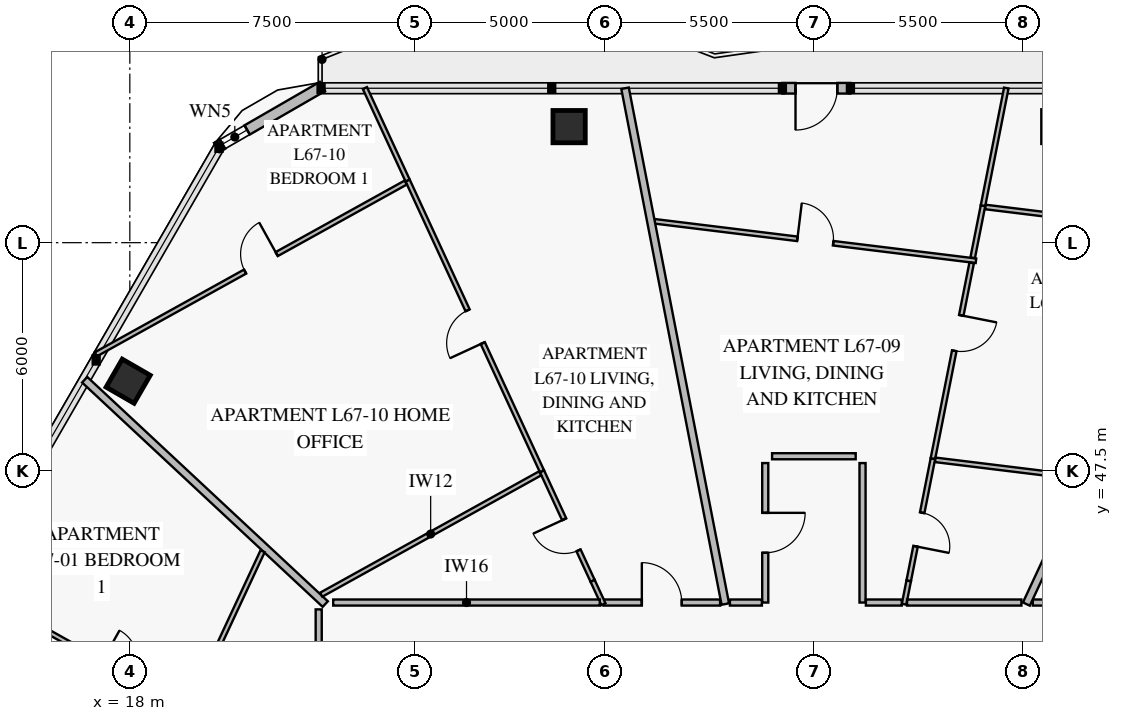
"""IFC4 building model, lengths in metres.
Left out: names, types, materials, properties, quantities, classifications, styles, units other than length and angle.
Written with IfcOpenShell. Run it as: python <this file> out.ifc"""

import sys

from ifc_helpers import new_model, si_unit, direction, frame, frame_2d, origin, origin_2d, place, context, subcontext, project, spatial, rectangle, extrude, element, fill, save


model = new_model("IFC4")
c1 = context("Model", 3, precision=1e-05, world=origin(), true_north=direction((0.0, 1.0)))
c2 = subcontext(c1, "Body", "Model", "MODEL_VIEW")
j1 = project(units=[si_unit("LENGTHUNIT", "METRE"), si_unit("PLANEANGLEUNIT", "RADIAN")], contexts=[c1])
p1 = place(None, origin())
s1 = spatial("IfcSite", under=j1, at=p1, CompositionType="ELEMENT")
p2 = place(p1, origin())
s2 = spatial("IfcBuilding", under=s1, at=p2, CompositionType="ELEMENT")
p3 = place(p2, frame((0.0, 0.0, 265.4)))
s3 = spatial("IfcBuildingStorey", under=s2, at=p3, CompositionType="ELEMENT", Elevation=265.4)
for number, where, z_axis, x_axis in (
    (1, (42.441, 56.554, 0.0), (0.0, 0.0, 1.0), (-1.0, 0.0, 0.0)),
    (2, (29.559, 56.554, 0.0), (0.0, 0.0, 1.0), (-1.0, 0.0, 0.0)),
    (3, (17.956, 49.855, 0.0), (0.0, 0.0, 1.0), (-0.5, -0.866, 0.0)),
):
    element("IfcColumn", number, at=place(p3, frame(where, z_axis=z_axis, x_axis=x_axis)), inside=s3, PredefinedType="COLUMN", context=c2, shape_type="SweptSolid", body=[
        extrude(rectangle(XDim=0.85, YDim=0.85, at=origin_2d()), origin(), (0.0, 0.0, 1.0), 3.55),
    ])
p4 = place(p3, frame((20.285, 56.004, 0.0), z_axis=(0.0, 0.0, 1.0), x_axis=(0.866028773314, 0.499994163758, 0.0)))
e4 = element("IfcWall", 4, at=p4, inside=s3, PredefinedType="SOLIDWALL", context=c2, shape_type="SweptSolid", body=[
    extrude(rectangle(XDim=3.215, YDim=0.28, at=frame_2d((1.607, 0.0))), origin(), (0.0, 0.0, 1.0), 3.55),
])
p5 = place(p4, frame((0.176, 0.0, 0.85)))
e5 = element("IfcOpeningElement", 5, at=p5, cuts=e4, PredefinedType="OPENING", context=c2, shape_type="SweptSolid", body=[
    extrude(rectangle(XDim=0.75, YDim=1.5, at=frame_2d((0.375, 0.75))), frame((0.0, 0.152, 0.0), z_axis=(0.0, -1.0, 0.0), x_axis=(1.0, 0.0, 0.0)), (0.0, 0.0, 1.0), 0.304),
])
p6 = place(p3, frame((35.171, 57.564, 0.0), z_axis=(0.0, 0.0, 1.0), x_axis=(1.0, 0.0, 0.0)))
e6 = element("IfcWall", 6, at=p6, inside=s3, PredefinedType="SOLIDWALL", context=c2, shape_type="SweptSolid", body=[
    extrude(rectangle(XDim=1.79, YDim=0.28, at=frame_2d((0.895, 0.0))), origin(), (0.0, 0.0, 1.0), 3.55),
])
p7 = place(p6, frame((0.345, 0.0, 0.0)))
e7 = element("IfcOpeningElement", 7, at=p7, cuts=e6, PredefinedType="OPENING", context=c2, shape_type="SweptSolid", body=[
    extrude(rectangle(XDim=1.1, YDim=2.2, at=frame_2d((0.55, 1.1))), frame((0.0, 0.152, 0.0), z_axis=(0.0, -1.0, 0.0), x_axis=(1.0, 0.0, 0.0)), (0.0, 0.0, 1.0), 0.304),
])
p8 = place(p3, frame((16.741, 42.763, 0.0), z_axis=(0.0, 0.0, 1.0), x_axis=(-0.872910360515, 0.487880623212, 0.0)))
e8 = element("IfcWall", 8, at=p8, inside=s3, PredefinedType="PARTITIONING", context=c2, shape_type="SweptSolid", body=[
    extrude(rectangle(XDim=3.508, YDim=0.12, at=frame_2d((1.754, 0.0))), origin(), (0.0, 0.0, 1.0), 2.93),
])
p9 = place(p3, frame((48.85, 44.03, 0.0), z_axis=(0.0, 0.0, 1.0), x_axis=(-1.0, 0.0, 0.0)))
e9 = element("IfcWall", 9, at=p9, inside=s3, PredefinedType="PARTITIONING", context=c2, shape_type="SweptSolid", body=[
    extrude(rectangle(XDim=7.09, YDim=0.16, at=frame_2d((3.545, 0.0))), origin(), (0.0, 0.0, 1.0), 2.95),
])
p10 = place(p9, frame((3.02, 0.0, 0.0)))
e10 = element("IfcOpeningElement", 10, at=p10, cuts=e9, PredefinedType="OPENING", context=c2, shape_type="SweptSolid", body=[
    extrude(rectangle(XDim=1.05, YDim=2.15, at=frame_2d((0.525, 1.075))), frame((0.0, 0.092, 0.0), z_axis=(0.0, -1.0, 0.0), x_axis=(1.0, 0.0, 0.0)), (0.0, 0.0, 1.0), 0.184),
])
p11 = place(p3, frame((40.265, 53.024, 0.0), z_axis=(0.0, 0.0, 1.0), x_axis=(-0.992544489296, 0.121882881359, 0.0)))
e11 = element("IfcWall", 11, at=p11, inside=s3, PredefinedType="PARTITIONING", context=c2, shape_type="SweptSolid", body=[
    extrude(rectangle(XDim=8.519, YDim=0.12, at=frame_2d((4.26, 0.0))), origin(), (0.0, 0.0, 1.0), 3.55),
])
p12 = place(p11, frame((3.784, 0.0, 0.0)))
e12 = element("IfcOpeningElement", 12, at=p12, cuts=e11, PredefinedType="OPENING", context=c2, shape_type="SweptSolid", body=[
    extrude(rectangle(XDim=0.95, YDim=2.1, at=frame_2d((0.475, 1.05))), frame((0.0, 0.072, 0.0), z_axis=(0.0, -1.0, 0.0), x_axis=(1.0, 0.0, 0.0)), (0.0, 0.0, 1.0), 0.144),
])
p13 = place(p3, frame((38.495, 44.6, 0.0), z_axis=(0.0, 0.0, 1.0), x_axis=(0.194240919575, 0.980953854757, 0.0)))
e13 = element("IfcWall", 13, at=p13, inside=s3, PredefinedType="PARTITIONING", context=c2, shape_type="SweptSolid", body=[
    extrude(rectangle(XDim=3.281, YDim=0.12, at=frame_2d((1.64, 0.0))), origin(), (0.0, 0.0, 1.0), 3.55),
])
p14 = place(p13, frame((0.928, 0.0, 0.0)))
e14 = element("IfcOpeningElement", 14, at=p14, cuts=e13, PredefinedType="OPENING", context=c2, shape_type="SweptSolid", body=[
    extrude(rectangle(XDim=0.9, YDim=2.1, at=frame_2d((0.45, 1.05))), frame((0.0, 0.072, 0.0), z_axis=(0.0, -1.0, 0.0), x_axis=(1.0, 0.0, 0.0)), (0.0, 0.0, 1.0), 0.144),
])
p15 = place(p3, frame((39.132, 47.818, 0.0), z_axis=(0.0, 0.0, 1.0), x_axis=(0.194247124133, 0.980952626158, 0.0)))
e15 = element("IfcWall", 15, at=p15, inside=s3, PredefinedType="PARTITIONING", context=c2, shape_type="SweptSolid", body=[
    extrude(rectangle(XDim=5.251, YDim=0.12, at=frame_2d((2.625, 0.0))), origin(), (0.0, 0.0, 1.0), 3.15),
])
p16 = place(p15, frame((2.892, 0.0, 0.0)))
e16 = element("IfcOpeningElement", 16, at=p16, cuts=e15, PredefinedType="OPENING", context=c2, shape_type="SweptSolid", body=[
    extrude(rectangle(XDim=0.95, YDim=2.1, at=frame_2d((0.475, 1.05))), frame((0.0, 0.072, 0.0), z_axis=(0.0, -1.0, 0.0), x_axis=(1.0, 0.0, 0.0)), (0.0, 0.0, 1.0), 0.144),
])
p17 = place(p3, frame((40.178, 53.103, 0.0), z_axis=(0.0, 0.0, 1.0), x_axis=(0.194299662618, 0.980942221085, 0.0)))
e17 = element("IfcWall", 17, at=p17, inside=s3, PredefinedType="PARTITIONING", context=c2, shape_type="SweptSolid", body=[
    extrude(rectangle(XDim=1.396, YDim=0.12, at=frame_2d((0.698, 0.0))), origin(), (0.0, 0.0, 1.0), 3.55),
])
p18 = place(p3, frame((46.028, 53.762, 0.0), z_axis=(0.0, 0.0, 1.0), x_axis=(-0.992544574318, 0.121882188984, 0.0)))
e18 = element("IfcWall", 18, at=p18, inside=s3, PredefinedType="PARTITIONING", context=c2, shape_type="SweptSolid", body=[
    extrude(rectangle(XDim=5.557, YDim=0.12, at=frame_2d((2.778, 0.0))), origin(), (0.0, 0.0, 1.0), 2.95),
])
p19 = place(p18, frame((2.387, 0.0, 0.0)))
e19 = element("IfcOpeningElement", 19, at=p19, cuts=e18, PredefinedType="OPENING", context=c2, shape_type="SweptSolid", body=[
    extrude(rectangle(XDim=0.95, YDim=2.1, at=frame_2d((0.475, 1.05))), frame((0.0, 0.072, 0.0), z_axis=(0.0, -1.0, 0.0), x_axis=(1.0, 0.0, 0.0)), (0.0, 0.0, 1.0), 0.144),
])
p20 = place(p3, frame((34.72, 47.7, 0.0), z_axis=(0.0, 0.0, 1.0), x_axis=(0.0, -1.0, 0.0)))
e20 = element("IfcWall", 20, at=p20, inside=s3, PredefinedType="PARTITIONING", context=c2, shape_type="SweptSolid", body=[
    extrude(rectangle(XDim=3.67, YDim=0.16, at=frame_2d((1.835, 0.0))), origin(), (0.0, 0.0, 1.0), 3.55),
])
p21 = place(p20, frame((1.31, 0.0, 0.0)))
e21 = element("IfcOpeningElement", 21, at=p21, cuts=e20, PredefinedType="OPENING", context=c2, shape_type="SweptSolid", body=[
    extrude(rectangle(XDim=1.05, YDim=2.15, at=frame_2d((0.525, 1.075))), frame((0.0, 0.092, 0.0), z_axis=(0.0, -1.0, 0.0), x_axis=(1.0, 0.0, 0.0)), (0.0, 0.0, 1.0), 0.184),
])
p22 = place(p3, frame((30.178, 44.6, 0.0), z_axis=(0.0, 0.0, 1.0), x_axis=(-0.419438119549, 0.907783930167, 0.0)))
e22 = element("IfcWall", 22, at=p22, inside=s3, PredefinedType="PARTITIONING", context=c2, shape_type="SweptSolid", body=[
    extrude(rectangle(XDim=3.178, YDim=0.12, at=frame_2d((1.589, 0.0))), origin(), (0.0, 0.0, 1.0), 3.55),
])
p23 = place(p22, frame((0.885, 0.0, 0.0)))
e23 = element("IfcOpeningElement", 23, at=p23, cuts=e22, PredefinedType="OPENING", context=c2, shape_type="SweptSolid", body=[
    extrude(rectangle(XDim=0.9, YDim=2.1, at=frame_2d((0.45, 1.05))), frame((0.0, 0.072, 0.0), z_axis=(0.0, -1.0, 0.0), x_axis=(1.0, 0.0, 0.0)), (0.0, 0.0, 1.0), 0.144),
])
p24 = place(p3, frame((28.845, 47.485, 0.0), z_axis=(0.0, 0.0, 1.0), x_axis=(-0.419453006553, 0.907777051535, 0.0)))
e24 = element("IfcWall", 24, at=p24, inside=s3, PredefinedType="PARTITIONING", context=c2, shape_type="SweptSolid", body=[
    extrude(rectangle(XDim=8.43, YDim=0.12, at=frame_2d((4.215, 0.0))), origin(), (0.0, 0.0, 1.0), 2.93),
])
p25 = place(p24, frame((3.715, 0.0, 0.0)))
e25 = element("IfcOpeningElement", 25, at=p25, cuts=e24, PredefinedType="OPENING", context=c2, shape_type="SweptSolid", body=[
    extrude(rectangle(XDim=0.95, YDim=2.1, at=frame_2d((0.475, 1.05))), frame((0.0, 0.072, 0.0), z_axis=(0.0, -1.0, 0.0), x_axis=(1.0, 0.0, 0.0)), (0.0, 0.0, 1.0), 0.144),
])
p26 = place(p3, frame((25.26, 55.082, 0.0), z_axis=(0.0, 0.0, 1.0), x_axis=(-0.874617638419, -0.484813352298, 0.0)))
e26 = element("IfcWall", 26, at=p26, inside=s3, PredefinedType="PARTITIONING", context=c2, shape_type="SweptSolid", body=[
    extrude(rectangle(XDim=9.323, YDim=0.12, at=frame_2d((4.661, 0.0))), origin(), (0.0, 0.0, 1.0), 3.55),
])
p27 = place(p26, frame((3.882, 0.0, 0.0)))
e27 = element("IfcOpeningElement", 27, at=p27, cuts=e26, PredefinedType="OPENING", context=c2, shape_type="SweptSolid", body=[
    extrude(rectangle(XDim=0.95, YDim=2.1, at=frame_2d((0.475, 1.05))), frame((0.0, 0.072, 0.0), z_axis=(0.0, -1.0, 0.0), x_axis=(1.0, 0.0, 0.0)), (0.0, 0.0, 1.0), 0.144),
])
p28 = place(p3, frame((33.532, 44.03, 0.0), z_axis=(0.0, 0.0, 1.0), x_axis=(-1.0, 0.0, 0.0)))
e28 = element("IfcWall", 28, at=p28, inside=s3, PredefinedType="PARTITIONING", context=c2, shape_type="SweptSolid", body=[
    extrude(rectangle(XDim=3.069, YDim=0.16, at=frame_2d((1.534, 0.0))), origin(), (0.0, 0.0, 1.0), 2.95),
])
p29 = place(p28, frame((1.009, 0.0, 0.0)))
e29 = element("IfcOpeningElement", 29, at=p29, cuts=e28, PredefinedType="OPENING", context=c2, shape_type="SweptSolid", body=[
    extrude(rectangle(XDim=1.05, YDim=2.15, at=frame_2d((0.525, 1.075))), frame((0.0, 0.092, 0.0), z_axis=(0.0, -1.0, 0.0), x_axis=(1.0, 0.0, 0.0)), (0.0, 0.0, 1.0), 0.184),
])
p30 = place(p3, frame((23.143, 43.99, 0.0), z_axis=(0.0, 0.0, 1.0), x_axis=(-0.731342217011, 0.682010675589, 0.0)))
e30 = element("IfcWall", 30, at=p30, inside=s3, PredefinedType="PARTITIONING", context=c2, shape_type="SweptSolid", body=[
    extrude(rectangle(XDim=8.656, YDim=0.2, at=frame_2d((4.328, 0.0))), origin(), (0.0, 0.0, 1.0), 2.93),
])
p31 = place(p3, frame((21.494, 45.38, 0.0), z_axis=(0.0, 0.0, 1.0), x_axis=(-0.422603236373, -0.906314793329, 0.0)))
e31 = element("IfcWall", 31, at=p31, inside=s3, PredefinedType="PARTITIONING", context=c2, shape_type="SweptSolid", body=[
    extrude(rectangle(XDim=4.547, YDim=0.12, at=frame_2d((2.273, 0.0))), origin(), (0.0, 0.0, 1.0), 3.15),
])
p32 = place(p3, frame((41.591, 43.99, 0.0), z_axis=(0.0, 0.0, 1.0), x_axis=(0.422607909104, 0.906312614479, 0.0)))
e32 = element("IfcWall", 32, at=p32, inside=s3, PredefinedType="PARTITIONING", context=c2, shape_type="SweptSolid", body=[
    extrude(rectangle(XDim=14.977, YDim=0.2, at=frame_2d((7.488, 0.0))), origin(), (0.0, 0.0, 1.0), 2.93),
])
p33 = place(p3, frame((38.373, 43.986, 0.0), z_axis=(0.0, 0.0, 1.0), x_axis=(0.194092051537, 0.98098332072, 0.0)))
e33 = element("IfcWall", 33, at=p33, inside=s3, PredefinedType="PARTITIONING", context=c2, shape_type="SweptSolid", body=[
    extrude(rectangle(XDim=0.626, YDim=0.12, at=frame_2d((0.313, 0.0))), origin(), (0.0, 0.0, 1.0), 3.55),
])
p34 = place(p3, frame((40.45, 54.472, 0.0), z_axis=(0.0, 0.0, 1.0), x_axis=(0.194226638518, 0.980956682474, 0.0)))
e34 = element("IfcWall", 34, at=p34, inside=s3, PredefinedType="PARTITIONING", context=c2, shape_type="SweptSolid", body=[
    extrude(rectangle(XDim=3.156, YDim=0.12, at=frame_2d((1.578, 0.0))), origin(), (0.0, 0.0, 1.0), 2.93),
])
p35 = place(p3, frame((43.022, 47.315, 0.0), z_axis=(0.0, 0.0, 1.0), x_axis=(-0.992546276814, 0.121868323949, 0.0)))
e35 = element("IfcWall", 35, at=p35, inside=s3, PredefinedType="PARTITIONING", context=c2, shape_type="SweptSolid", body=[
    extrude(rectangle(XDim=3.856, YDim=0.12, at=frame_2d((1.928, 0.0))), origin(), (0.0, 0.0, 1.0), 2.95),
])
p36 = place(p3, frame((33.669, 43.99, 0.0), z_axis=(0.0, 0.0, 1.0), x_axis=(-0.190806334077, 0.981627700748, 0.0)))
e36 = element("IfcWall", 36, at=p36, inside=s3, PredefinedType="PARTITIONING", context=c2, shape_type="SweptSolid", body=[
    extrude(rectangle(XDim=13.828, YDim=0.2, at=frame_2d((6.914, 0.0))), origin(), (0.0, 0.0, 1.0), 2.93),
])
p37 = place(p3, frame((30.461, 43.987, 0.0), z_axis=(0.0, 0.0, 1.0), x_axis=(-0.419516805105, 0.907747569666, 0.0)))
e37 = element("IfcWall", 37, at=p37, inside=s3, PredefinedType="PARTITIONING", context=c2, shape_type="SweptSolid", body=[
    extrude(rectangle(XDim=0.675, YDim=0.12, at=frame_2d((0.337, 0.0))), origin(), (0.0, 0.0, 1.0), 3.55),
])
p38 = place(p3, frame((25.309, 55.137, 0.0), z_axis=(0.0, 0.0, 1.0), x_axis=(-0.419509024285, 0.907751165542, 0.0)))
e38 = element("IfcWall", 38, at=p38, inside=s3, PredefinedType="PARTITIONING", context=c2, shape_type="SweptSolid", body=[
    extrude(rectangle(XDim=2.678, YDim=0.12, at=frame_2d((1.339, 0.0))), origin(), (0.0, 0.0, 1.0), 3.55),
])
p39 = place(p3, frame((28.796, 47.429, 0.0), z_axis=(0.0, 0.0, 1.0), x_axis=(-0.874623780767, -0.484802271155, 0.0)))
e39 = element("IfcWall", 39, at=p39, inside=s3, PredefinedType="PARTITIONING", context=c2, shape_type="SweptSolid", body=[
    extrude(rectangle(XDim=6.585, YDim=0.12, at=frame_2d((3.293, 0.0))), origin(), (0.0, 0.0, 1.0), 2.95),
])
p40 = place(p3, frame((22.97, 43.85, 0.0), z_axis=(0.0, 0.0, 1.0), x_axis=(0.0, -1.0, 0.0)))
e40 = element("IfcWall", 40, at=p40, inside=s3, PredefinedType="PARTITIONING", context=c2, shape_type="SweptSolid", body=[
    extrude(rectangle(XDim=4.49, YDim=0.16, at=frame_2d((2.245, 0.0))), origin(), (0.0, 0.0, 1.0), 3.55),
])
p41 = place(p3, frame((37.28, 44.03, 0.0), z_axis=(0.0, 0.0, 1.0), x_axis=(0.0, 1.0, 0.0)))
e41 = element("IfcWall", 41, at=p41, inside=s3, PredefinedType="PARTITIONING", context=c2, shape_type="SweptSolid", body=[
    extrude(rectangle(XDim=3.67, YDim=0.16, at=frame_2d((1.835, 0.0))), origin(), (0.0, 0.0, 1.0), 3.55),
])
p42 = place(p3, frame((37.1, 47.88, 0.0), z_axis=(0.0, 0.0, 1.0), x_axis=(-1.0, 0.0, 0.0)))
e42 = element("IfcWall", 42, at=p42, inside=s3, PredefinedType="PARTITIONING", context=c2, shape_type="SweptSolid", body=[
    extrude(rectangle(XDim=2.2, YDim=0.16, at=frame_2d((1.1, 0.0))), origin(), (0.0, 0.0, 1.0), 3.55),
])
p43 = place(p3, frame((38.313, 44.03, 0.0), z_axis=(0.0, 0.0, 1.0), x_axis=(-1.0, 0.0, 0.0)))
e43 = element("IfcWall", 43, at=p43, inside=s3, PredefinedType="PARTITIONING", context=c2, shape_type="SweptSolid", body=[
    extrude(rectangle(XDim=0.945, YDim=0.16, at=frame_2d((0.472, 0.0))), origin(), (0.0, 0.0, 1.0), 3.55),
])
p44 = place(p3, frame((34.632, 44.03, 0.0), z_axis=(0.0, 0.0, 1.0), x_axis=(-1.0, 0.0, 0.0)))
e44 = element("IfcWall", 44, at=p44, inside=s3, PredefinedType="PARTITIONING", context=c2, shape_type="SweptSolid", body=[
    extrude(rectangle(XDim=0.841, YDim=0.16, at=frame_2d((0.421, 0.0))), origin(), (0.0, 0.0, 1.0), 3.55),
])
p45 = place(p3, frame((41.46, 44.03, 0.0), z_axis=(0.0, 0.0, 1.0), x_axis=(-1.0, 0.0, 0.0)))
e45 = element("IfcWall", 45, at=p45, inside=s3, PredefinedType="PARTITIONING", context=c2, shape_type="SweptSolid", body=[
    extrude(rectangle(XDim=3.009, YDim=0.16, at=frame_2d((1.504, 0.0))), origin(), (0.0, 0.0, 1.0), 2.95),
])
p46 = place(p3, frame((30.366, 44.03, 0.0), z_axis=(0.0, 0.0, 1.0), x_axis=(-1.0, 0.0, 0.0)))
e46 = element("IfcWall", 46, at=p46, inside=s3, PredefinedType="PARTITIONING", context=c2, shape_type="SweptSolid", body=[
    extrude(rectangle(XDim=7.014, YDim=0.16, at=frame_2d((3.507, 0.0))), origin(), (0.0, 0.0, 1.0), 2.95),
])
p47 = place(p5, origin())
e47 = element("IfcWindow", 47, at=p47, inside=s3, PartitioningType="SINGLE_PANEL", PredefinedType="WINDOW", context=c2, shape_type="SweptSolid", body=[
    extrude(rectangle(XDim=0.75, YDim=1.5, at=frame_2d((0.375, 0.75))), frame((0.0, 0.03, 0.0), z_axis=(0.0, -1.0, 0.0), x_axis=(1.0, 0.0, 0.0)), (0.0, 0.0, 1.0), 0.06),
])
fill(e5, e47)
p48 = place(p7, frame((1.1, 0.0, 0.0), z_axis=(0.0, 0.0, 1.0), x_axis=(-1.0, 0.0, 0.0)))
e48 = element("IfcDoor", 48, at=p48, inside=s3, OperationType="SINGLE_SWING_RIGHT", PredefinedType="DOOR", context=c2, shape_type="SweptSolid", body=[
    extrude(rectangle(XDim=1.1, YDim=2.2, at=frame_2d((0.55, 1.1))), frame((0.0, 0.025, 0.0), z_axis=(0.0, -1.0, 0.0), x_axis=(1.0, 0.0, 0.0)), (0.0, 0.0, 1.0), 0.05),
])
fill(e7, e48)
p49 = place(p12, frame((0.95, 0.0, 0.0), z_axis=(0.0, 0.0, 1.0), x_axis=(-1.0, 0.0, 0.0)))
e49 = element("IfcDoor", 49, at=p49, inside=s3, OperationType="SINGLE_SWING_LEFT", PredefinedType="DOOR", context=c2, shape_type="SweptSolid", body=[
    extrude(rectangle(XDim=0.95, YDim=2.1, at=frame_2d((0.475, 1.05))), frame((0.0, 0.025, 0.0), z_axis=(0.0, -1.0, 0.0), x_axis=(1.0, 0.0, 0.0)), (0.0, 0.0, 1.0), 0.05),
])
fill(e12, e49)
p50 = place(p14, frame((0.9, 0.0, 0.0), z_axis=(0.0, 0.0, 1.0), x_axis=(-1.0, 0.0, 0.0)))
e50 = element("IfcDoor", 50, at=p50, inside=s3, OperationType="SINGLE_SWING_RIGHT", PredefinedType="DOOR", context=c2, shape_type="SweptSolid", body=[
    extrude(rectangle(XDim=0.9, YDim=2.1, at=frame_2d((0.45, 1.05))), frame((0.0, 0.025, 0.0), z_axis=(0.0, -1.0, 0.0), x_axis=(1.0, 0.0, 0.0)), (0.0, 0.0, 1.0), 0.05),
])
fill(e14, e50)
p51 = place(p16, frame((0.95, 0.0, 0.0), z_axis=(0.0, 0.0, 1.0), x_axis=(-1.0, 0.0, 0.0)))
e51 = element("IfcDoor", 51, at=p51, inside=s3, OperationType="SINGLE_SWING_LEFT", PredefinedType="DOOR", context=c2, shape_type="SweptSolid", body=[
    extrude(rectangle(XDim=0.95, YDim=2.1, at=frame_2d((0.475, 1.05))), frame((0.0, 0.025, 0.0), z_axis=(0.0, -1.0, 0.0), x_axis=(1.0, 0.0, 0.0)), (0.0, 0.0, 1.0), 0.05),
])
fill(e16, e51)
p52 = place(p21, origin())
e52 = element("IfcDoor", 52, at=p52, inside=s3, OperationType="SINGLE_SWING_LEFT", PredefinedType="DOOR", context=c2, shape_type="SweptSolid", body=[
    extrude(rectangle(XDim=1.05, YDim=2.15, at=frame_2d((0.525, 1.075))), frame((0.0, 0.025, 0.0), z_axis=(0.0, -1.0, 0.0), x_axis=(1.0, 0.0, 0.0)), (0.0, 0.0, 1.0), 0.05),
])
fill(e21, e52)
p53 = place(p23, origin())
e53 = element("IfcDoor", 53, at=p53, inside=s3, OperationType="SINGLE_SWING_RIGHT", PredefinedType="DOOR", context=c2, shape_type="SweptSolid", body=[
    extrude(rectangle(XDim=0.9, YDim=2.1, at=frame_2d((0.45, 1.05))), frame((0.0, 0.025, 0.0), z_axis=(0.0, -1.0, 0.0), x_axis=(1.0, 0.0, 0.0)), (0.0, 0.0, 1.0), 0.05),
])
fill(e23, e53)
p54 = place(p25, origin())
e54 = element("IfcDoor", 54, at=p54, inside=s3, OperationType="SINGLE_SWING_LEFT", PredefinedType="DOOR", context=c2, shape_type="SweptSolid", body=[
    extrude(rectangle(XDim=0.95, YDim=2.1, at=frame_2d((0.475, 1.05))), frame((0.0, 0.025, 0.0), z_axis=(0.0, -1.0, 0.0), x_axis=(1.0, 0.0, 0.0)), (0.0, 0.0, 1.0), 0.05),
])
fill(e25, e54)
p55 = place(p27, frame((0.95, 0.0, 0.0), z_axis=(0.0, 0.0, 1.0), x_axis=(-1.0, 0.0, 0.0)))
e55 = element("IfcDoor", 55, at=p55, inside=s3, OperationType="SINGLE_SWING_RIGHT", PredefinedType="DOOR", context=c2, shape_type="SweptSolid", body=[
    extrude(rectangle(XDim=0.95, YDim=2.1, at=frame_2d((0.475, 1.05))), frame((0.0, 0.025, 0.0), z_axis=(0.0, -1.0, 0.0), x_axis=(1.0, 0.0, 0.0)), (0.0, 0.0, 1.0), 0.05),
])
fill(e27, e55)
p56 = place(p29, frame((1.05, 0.0, 0.0), z_axis=(0.0, 0.0, 1.0), x_axis=(-1.0, 0.0, 0.0)))
e56 = element("IfcDoor", 56, at=p56, inside=s3, OperationType="SINGLE_SWING_LEFT", PredefinedType="DOOR", context=c2, shape_type="SweptSolid", body=[
    extrude(rectangle(XDim=1.05, YDim=2.15, at=frame_2d((0.525, 1.075))), frame((0.0, 0.025, 0.0), z_axis=(0.0, -1.0, 0.0), x_axis=(1.0, 0.0, 0.0)), (0.0, 0.0, 1.0), 0.05),
])
fill(e29, e56)
save(model, sys.argv[1])
